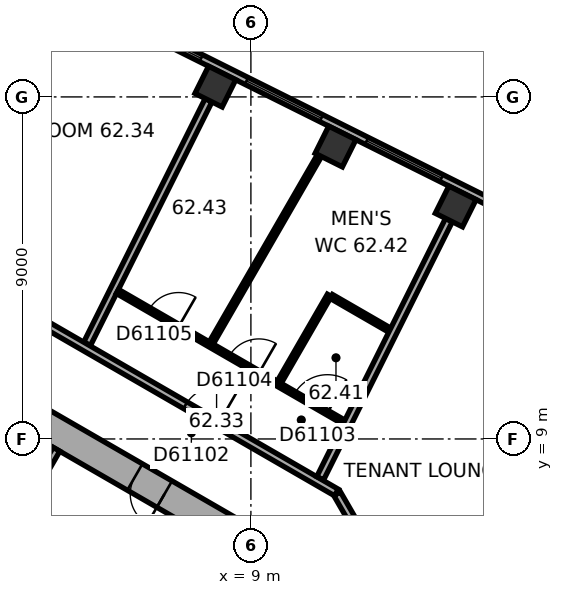
"""IFC4 building model, lengths in metres.
Left out: names, types, materials, properties, quantities, classifications, styles, units other than length and angle.
Written with IfcOpenShell. Run it as: python <this file> out.ifc"""

import sys

from ifc_helpers import new_model, si_unit, direction, frame, frame_2d, origin, origin_2d, place, context, subcontext, project, spatial, rectangle, extrude, element, fill, save


model = new_model("IFC4")
c1 = context("Model", 3, precision=1e-05, world=origin(), true_north=direction((0.0, 1.0)))
c2 = subcontext(c1, "Body", "Model", "MODEL_VIEW")
j1 = project(units=[si_unit("LENGTHUNIT", "METRE"), si_unit("PLANEANGLEUNIT", "RADIAN")], contexts=[c1])
p1 = place(None, origin())
s1 = spatial("IfcSite", under=j1, at=p1, CompositionType="ELEMENT")
p2 = place(p1, origin())
s2 = spatial("IfcBuilding", under=s1, at=p2, CompositionType="ELEMENT")
p3 = place(p2, frame((0.0, 0.0, 251.3)))
s3 = spatial("IfcBuildingStorey", under=s2, at=p3, CompositionType="ELEMENT", Elevation=251.3)
for number, where, z_axis, x_axis in (
    (1, (14.389, 15.118, 0.0), (0.0, 0.0, 1.0), (-0.895, 0.446, 0.0)),
    (2, (11.227, 16.695, 0.0), (0.0, 0.0, 1.0), (-0.895, 0.446, 0.0)),
    (3, (8.064, 18.271, 0.0), (0.0, 0.0, 1.0), (-0.895, 0.446, 0.0)),
):
    element("IfcColumn", number, at=place(p3, frame(where, z_axis=z_axis, x_axis=x_axis)), inside=s3, PredefinedType="COLUMN", context=c2, shape_type="SweptSolid", body=[
        extrude(rectangle(XDim=0.8, YDim=0.8, at=origin_2d()), origin(), (0.0, 0.0, 1.0), 3.7),
    ])
p4 = place(p3, frame((10.1, 5.6, 0.0), z_axis=(0.0, 0.0, 1.0), x_axis=(-0.866023897231, 0.500002609418, 0.0)))
e4 = element("IfcWall", 4, at=p4, inside=s3, PredefinedType="SHEAR", context=c2, shape_type="SweptSolid", body=[
    extrude(rectangle(XDim=11.894, YDim=0.8, at=frame_2d((5.947, 0.0))), origin(), (0.0, 0.0, 1.0), 3.7),
])
p5 = place(p4, frame((3.897, 0.0, 0.0)))
e5 = element("IfcOpeningElement", 5, at=p5, cuts=e4, PredefinedType="OPENING", context=c2, shape_type="SweptSolid", body=[
    extrude(rectangle(XDim=0.9, YDim=2.1, at=frame_2d((0.45, 1.05))), frame((0.0, 0.41, 0.0), z_axis=(0.0, -1.0, 0.0), x_axis=(1.0, 0.0, 0.0)), (0.0, 0.0, 1.0), 0.82),
])
p6 = place(p4, frame((7.797, 0.0, 0.0)))
e6 = element("IfcOpeningElement", 6, at=p6, cuts=e4, PredefinedType="OPENING", context=c2, shape_type="SweptSolid", body=[
    extrude(rectangle(XDim=0.9, YDim=2.1, at=frame_2d((0.45, 1.05))), frame((0.0, 0.41, 0.0), z_axis=(0.0, -1.0, 0.0), x_axis=(1.0, 0.0, 0.0)), (0.0, 0.0, 1.0), 0.82),
])
p7 = place(p3, frame((18.299, 13.727, 0.0), z_axis=(0.0, 0.0, 1.0), x_axis=(-0.894934554817, 0.44619742558, 0.0)))
e7 = element("IfcWall", 7, at=p7, inside=s3, PredefinedType="STANDARD", context=c2, shape_type="SweptSolid", body=[
    extrude(rectangle(XDim=18.841, YDim=0.2, at=frame_2d((9.421, 0.0))), origin(), (0.0, 0.0, 1.0), 3.7),
])
p8 = place(p7, frame((1.253, 0.0, 0.9)))
e8 = element("IfcOpeningElement", 8, at=p8, cuts=e7, PredefinedType="OPENING", context=c2, shape_type="SweptSolid", body=[
    extrude(rectangle(XDim=2.2, YDim=2.0, at=frame_2d((1.1, 1.0))), frame((0.0, 0.11, 0.0), z_axis=(0.0, -1.0, 0.0), x_axis=(1.0, 0.0, 0.0)), (0.0, 0.0, 1.0), 0.22),
])
p9 = place(p7, frame((4.786, 0.0, 0.9)))
e9 = element("IfcOpeningElement", 9, at=p9, cuts=e7, PredefinedType="OPENING", context=c2, shape_type="SweptSolid", body=[
    extrude(rectangle(XDim=2.2, YDim=2.0, at=frame_2d((1.1, 1.0))), frame((0.0, 0.11, 0.0), z_axis=(0.0, -1.0, 0.0), x_axis=(1.0, 0.0, 0.0)), (0.0, 0.0, 1.0), 0.22),
])
p10 = place(p7, frame((8.32, 0.0, 0.9)))
e10 = element("IfcOpeningElement", 10, at=p10, cuts=e7, PredefinedType="OPENING", context=c2, shape_type="SweptSolid", body=[
    extrude(rectangle(XDim=2.2, YDim=2.0, at=frame_2d((1.1, 1.0))), frame((0.0, 0.11, 0.0), z_axis=(0.0, -1.0, 0.0), x_axis=(1.0, 0.0, 0.0)), (0.0, 0.0, 1.0), 0.22),
])
p11 = place(p7, frame((11.854, 0.0, 0.9)))
e11 = element("IfcOpeningElement", 11, at=p11, cuts=e7, PredefinedType="OPENING", context=c2, shape_type="SweptSolid", body=[
    extrude(rectangle(XDim=2.2, YDim=2.0, at=frame_2d((1.1, 1.0))), frame((0.0, 0.11, 0.0), z_axis=(0.0, -1.0, 0.0), x_axis=(1.0, 0.0, 0.0)), (0.0, 0.0, 1.0), 0.22),
])
p12 = place(p7, frame((15.387, 0.0, 0.9)))
e12 = element("IfcOpeningElement", 12, at=p12, cuts=e7, PredefinedType="OPENING", context=c2, shape_type="SweptSolid", body=[
    extrude(rectangle(XDim=2.2, YDim=2.0, at=frame_2d((1.1, 1.0))), frame((0.0, 0.11, 0.0), z_axis=(0.0, -1.0, 0.0), x_axis=(1.0, 0.0, 0.0)), (0.0, 0.0, 1.0), 0.22),
])
p13 = place(p3, frame((7.424, 4.259, 0.0), z_axis=(0.0, 0.0, 1.0), x_axis=(-0.866026010844, 0.49999894854, 0.0)))
e13 = element("IfcWall", 13, at=p13, inside=s3, PredefinedType="PARTITIONING", context=c2, shape_type="SweptSolid", body=[
    extrude(rectangle(XDim=8.0, YDim=0.2, at=frame_2d((4.0, 0.0))), origin(), (0.0, 0.0, 1.0), 3.35),
])
p14 = place(p3, frame((2.784, 6.822, 0.0), z_axis=(0.0, 0.0, 1.0), x_axis=(0.50002983664, 0.866008176907, 0.0)))
e14 = element("IfcWall", 14, at=p14, inside=s3, PredefinedType="PARTITIONING", context=c2, shape_type="SweptSolid", body=[
    extrude(rectangle(XDim=2.2, YDim=0.2, at=frame_2d((1.1, 0.0))), origin(), (0.0, 0.0, 1.0), 3.35),
])
p15 = place(p3, frame((6.303, 4.617, 0.0), z_axis=(0.0, 0.0, 1.0), x_axis=(-0.866027801685, 0.499995846692, 0.0)))
e15 = element("IfcWall", 15, at=p15, inside=s3, PredefinedType="SHEAR", context=c2, shape_type="SweptSolid", body=[
    extrude(rectangle(XDim=7.06, YDim=0.3, at=frame_2d((3.53, 0.0))), origin(), (0.0, 0.0, 1.0), 3.35),
])
p16 = place(p3, frame((7.886, 17.913, 0.0), z_axis=(0.0, 0.0, 1.0), x_axis=(-0.446204015428, -0.894931269213, 0.0)))
e16 = element("IfcWall", 16, at=p16, inside=s3, PredefinedType="PARTITIONING", context=c2, shape_type="SweptSolid", body=[
    extrude(rectangle(XDim=7.16, YDim=0.2, at=frame_2d((3.58, 0.0))), origin(), (0.0, 0.0, 1.0), 3.35),
])
p17 = place(p3, frame((10.805, 16.458, 0.0), z_axis=(0.0, 0.0, 1.0), x_axis=(-0.500025478307, -0.866010693377, 0.0)))
e17 = element("IfcWall", 17, at=p17, inside=s3, PredefinedType="PARTITIONING", context=c2, shape_type="SweptSolid", body=[
    extrude(rectangle(XDim=5.696, YDim=0.12, at=frame_2d((2.848, 0.0))), origin(), (0.0, 0.0, 1.0), 2.65),
])
p18 = place(p3, frame((11.065, 12.78, 0.0), z_axis=(0.0, 0.0, 1.0), x_axis=(-0.499938597367, -0.866060851709, 0.0)))
e18 = element("IfcWall", 18, at=p18, inside=s3, PredefinedType="PARTITIONING", context=c2, shape_type="SweptSolid", body=[
    extrude(rectangle(XDim=2.64, YDim=0.12, at=frame_2d((1.32, 0.0))), origin(), (0.0, 0.0, 1.0), 3.35),
])
p19 = place(p3, frame((11.25, 7.592, 0.0), z_axis=(0.0, 0.0, 1.0), x_axis=(-0.866024037175, 0.500002367029, 0.0)))
e19 = element("IfcWall", 19, at=p19, inside=s3, PredefinedType="PARTITIONING", context=c2, shape_type="SweptSolid", body=[
    extrude(rectangle(XDim=11.854, YDim=0.2, at=frame_2d((5.927, 0.0))), origin(), (0.0, 0.0, 1.0), 3.35),
])
p20 = place(p19, frame((3.59, 0.0, 0.0)))
e20 = element("IfcOpeningElement", 20, at=p20, cuts=e19, PredefinedType="OPENING", context=c2, shape_type="SweptSolid", body=[
    extrude(rectangle(XDim=1.0, YDim=2.1, at=frame_2d((0.5, 1.05))), frame((0.0, 0.11, 0.0), z_axis=(0.0, -1.0, 0.0), x_axis=(1.0, 0.0, 0.0)), (0.0, 0.0, 1.0), 0.22),
])
p21 = place(p3, frame((11.447, 9.441, 0.0), z_axis=(0.0, 0.0, 1.0), x_axis=(-0.866016001002, 0.500016285743, 0.0)))
e21 = element("IfcWall", 21, at=p21, inside=s3, PredefinedType="PARTITIONING", context=c2, shape_type="SweptSolid", body=[
    extrude(rectangle(XDim=6.881, YDim=0.12, at=frame_2d((3.44, 0.0))), origin(), (0.0, 0.0, 1.0), 3.35),
])
p22 = place(p21, frame((0.5, 0.0, 0.0)))
e22 = element("IfcOpeningElement", 22, at=p22, cuts=e21, PredefinedType="OPENING", context=c2, shape_type="SweptSolid", body=[
    extrude(rectangle(XDim=1.0, YDim=2.1, at=frame_2d((0.5, 1.05))), frame((0.0, 0.07, 0.0), z_axis=(0.0, -1.0, 0.0), x_axis=(1.0, 0.0, 0.0)), (0.0, 0.0, 1.0), 0.14),
])
p23 = place(p21, frame((2.583, 0.0, 0.0)))
e23 = element("IfcOpeningElement", 23, at=p23, cuts=e21, PredefinedType="OPENING", context=c2, shape_type="SweptSolid", body=[
    extrude(rectangle(XDim=0.9, YDim=2.1, at=frame_2d((0.45, 1.05))), frame((0.0, 0.07, 0.0), z_axis=(0.0, -1.0, 0.0), x_axis=(1.0, 0.0, 0.0)), (0.0, 0.0, 1.0), 0.14),
])
p24 = place(p21, frame((5.023, 0.0, 0.0)))
e24 = element("IfcOpeningElement", 24, at=p24, cuts=e21, PredefinedType="OPENING", context=c2, shape_type="SweptSolid", body=[
    extrude(rectangle(XDim=0.9, YDim=2.1, at=frame_2d((0.45, 1.05))), frame((0.0, 0.07, 0.0), z_axis=(0.0, -1.0, 0.0), x_axis=(1.0, 0.0, 0.0)), (0.0, 0.0, 1.0), 0.14),
])
p25 = place(p3, frame((12.18, 5.981, 0.0), z_axis=(0.0, 0.0, 1.0), x_axis=(-0.499904359745, 0.86608061467, 0.0)))
e25 = element("IfcWall", 25, at=p25, inside=s3, PredefinedType="PARTITIONING", context=c2, shape_type="SweptSolid", body=[
    extrude(rectangle(XDim=1.82, YDim=0.2, at=frame_2d((0.91, 0.0))), origin(), (0.0, 0.0, 1.0), 3.35),
])
p26 = place(p3, frame((12.654, 11.862, 0.0), z_axis=(0.0, 0.0, 1.0), x_axis=(-0.866025242659, 0.500000279077, 0.0)))
e26 = element("IfcWall", 26, at=p26, inside=s3, PredefinedType="PARTITIONING", context=c2, shape_type="SweptSolid", body=[
    extrude(rectangle(XDim=1.775, YDim=0.12, at=frame_2d((0.887, 0.0))), origin(), (0.0, 0.0, 1.0), 3.35),
])
p27 = place(p3, frame((14.211, 14.76, 0.0), z_axis=(0.0, 0.0, 1.0), x_axis=(-0.446197176117, -0.894934679195, 0.0)))
e27 = element("IfcWall", 27, at=p27, inside=s3, PredefinedType="PARTITIONING", context=c2, shape_type="SweptSolid", body=[
    extrude(rectangle(XDim=7.592, YDim=0.2, at=frame_2d((3.796, 0.0))), origin(), (0.0, 0.0, 1.0), 3.35),
])
p28 = place(p9, origin())
e28 = element("IfcWindow", 28, at=p28, inside=s3, PartitioningType="SINGLE_PANEL", PredefinedType="WINDOW", context=c2, shape_type="SweptSolid", body=[
    extrude(rectangle(XDim=2.2, YDim=2.0, at=frame_2d((1.1, 1.0))), frame((0.0, 0.03, 0.0), z_axis=(0.0, -1.0, 0.0), x_axis=(1.0, 0.0, 0.0)), (0.0, 0.0, 1.0), 0.06),
])
fill(e9, e28)
p29 = place(p10, origin())
e29 = element("IfcWindow", 29, at=p29, inside=s3, PartitioningType="SINGLE_PANEL", PredefinedType="WINDOW", context=c2, shape_type="SweptSolid", body=[
    extrude(rectangle(XDim=2.2, YDim=2.0, at=frame_2d((1.1, 1.0))), frame((0.0, 0.03, 0.0), z_axis=(0.0, -1.0, 0.0), x_axis=(1.0, 0.0, 0.0)), (0.0, 0.0, 1.0), 0.06),
])
fill(e10, e29)
p30 = place(p11, origin())
e30 = element("IfcWindow", 30, at=p30, inside=s3, PartitioningType="SINGLE_PANEL", PredefinedType="WINDOW", context=c2, shape_type="SweptSolid", body=[
    extrude(rectangle(XDim=2.2, YDim=2.0, at=frame_2d((1.1, 1.0))), frame((0.0, 0.03, 0.0), z_axis=(0.0, -1.0, 0.0), x_axis=(1.0, 0.0, 0.0)), (0.0, 0.0, 1.0), 0.06),
])
fill(e11, e30)
p31 = place(p5, origin())
e31 = element("IfcDoor", 31, at=p31, inside=s3, OperationType="SINGLE_SWING_LEFT", PredefinedType="DOOR", context=c2, shape_type="SweptSolid", body=[
    extrude(rectangle(XDim=0.9, YDim=2.1, at=frame_2d((0.45, 1.05))), frame((0.0, 0.025, 0.0), z_axis=(0.0, -1.0, 0.0), x_axis=(1.0, 0.0, 0.0)), (0.0, 0.0, 1.0), 0.05),
])
fill(e5, e31)
p32 = place(p20, origin())
e32 = element("IfcDoor", 32, at=p32, inside=s3, OperationType="SINGLE_SWING_LEFT", PredefinedType="DOOR", context=c2, shape_type="SweptSolid", body=[
    extrude(rectangle(XDim=1.0, YDim=2.1, at=frame_2d((0.5, 1.05))), frame((0.0, 0.025, 0.0), z_axis=(0.0, -1.0, 0.0), x_axis=(1.0, 0.0, 0.0)), (0.0, 0.0, 1.0), 0.05),
])
fill(e20, e32)
p33 = place(p22, origin())
e33 = element("IfcDoor", 33, at=p33, inside=s3, OperationType="SINGLE_SWING_LEFT", PredefinedType="DOOR", context=c2, shape_type="SweptSolid", body=[
    extrude(rectangle(XDim=1.0, YDim=2.1, at=frame_2d((0.5, 1.05))), frame((0.0, 0.025, 0.0), z_axis=(0.0, -1.0, 0.0), x_axis=(1.0, 0.0, 0.0)), (0.0, 0.0, 1.0), 0.05),
])
fill(e22, e33)
p34 = place(p23, origin())
e34 = element("IfcDoor", 34, at=p34, inside=s3, OperationType="SINGLE_SWING_LEFT", PredefinedType="DOOR", context=c2, shape_type="SweptSolid", body=[
    extrude(rectangle(XDim=0.9, YDim=2.1, at=frame_2d((0.45, 1.05))), frame((0.0, 0.025, 0.0), z_axis=(0.0, -1.0, 0.0), x_axis=(1.0, 0.0, 0.0)), (0.0, 0.0, 1.0), 0.05),
])
fill(e23, e34)
p35 = place(p24, origin())
e35 = element("IfcDoor", 35, at=p35, inside=s3, OperationType="SINGLE_SWING_LEFT", PredefinedType="DOOR", context=c2, shape_type="SweptSolid", body=[
    extrude(rectangle(XDim=0.9, YDim=2.1, at=frame_2d((0.45, 1.05))), frame((0.0, 0.025, 0.0), z_axis=(0.0, -1.0, 0.0), x_axis=(1.0, 0.0, 0.0)), (0.0, 0.0, 1.0), 0.05),
])
fill(e24, e35)
save(model, sys.argv[1])
